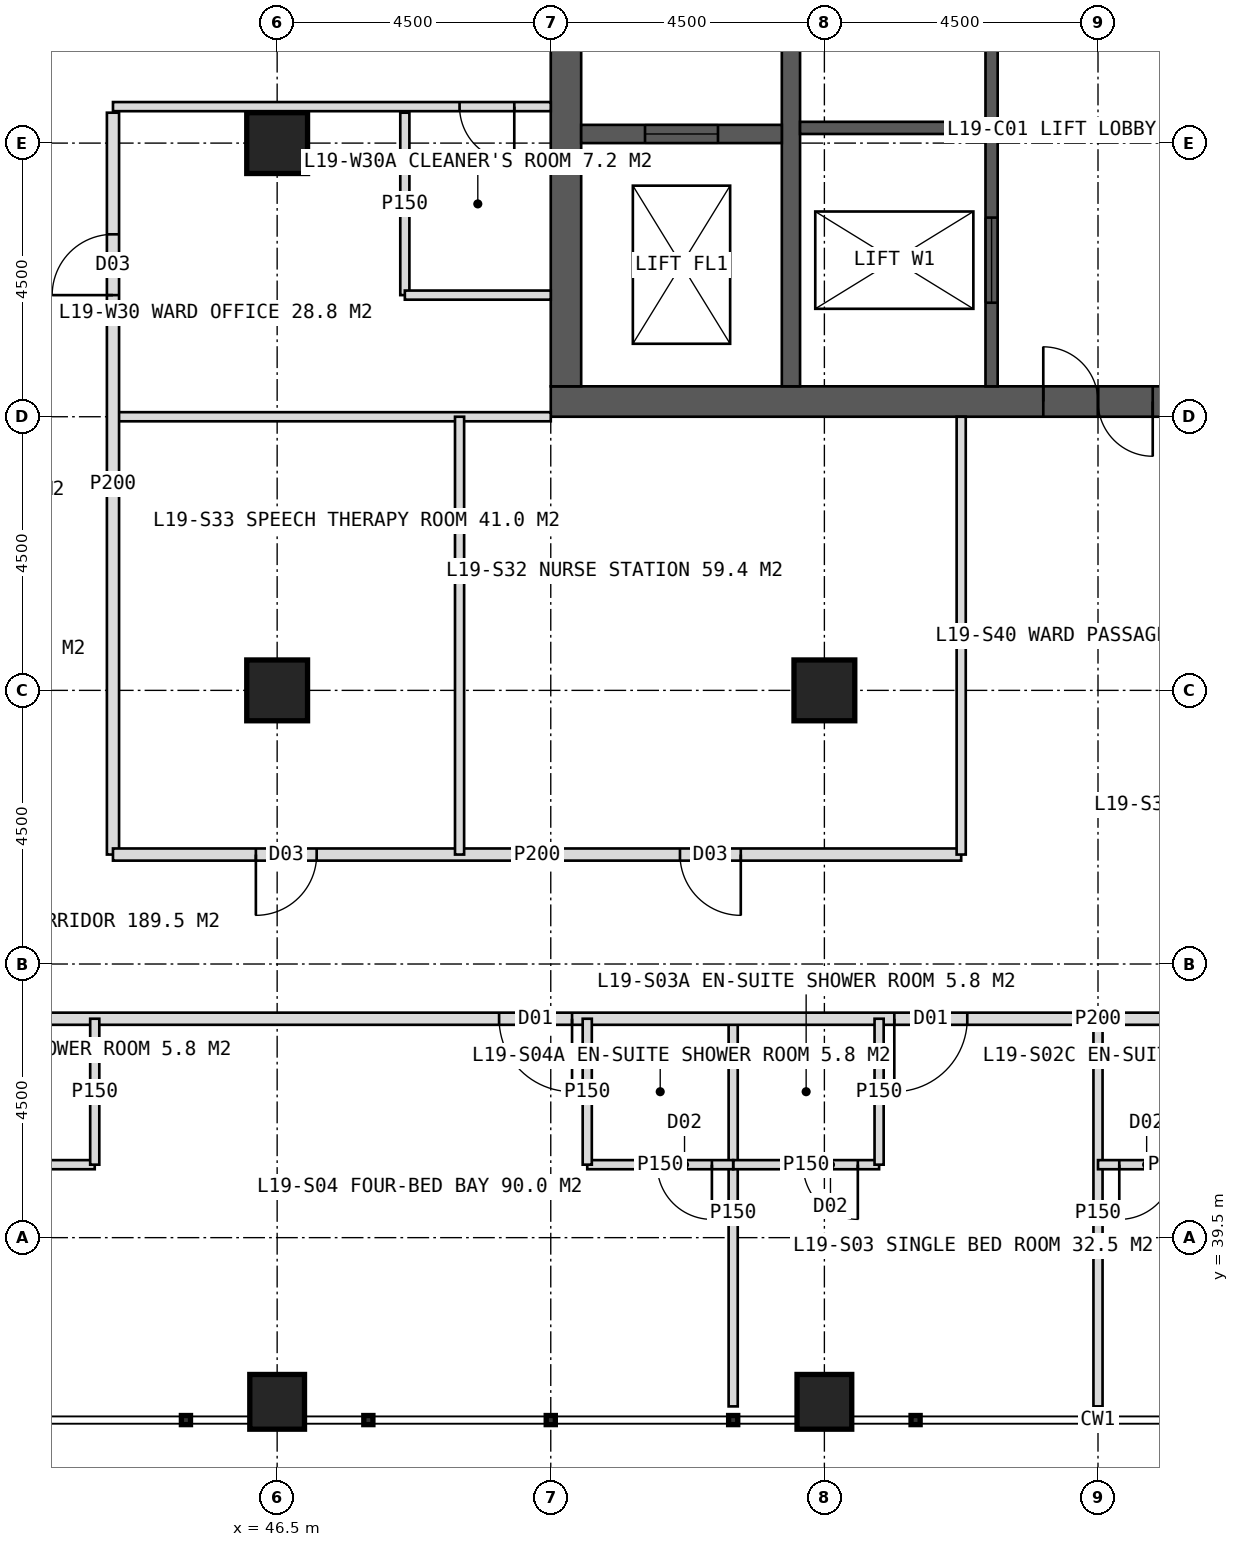
"""IFC4 building model, lengths in metres.
Left out: names, types, materials, properties, quantities, classifications, styles, units other than length and angle.
Written with IfcOpenShell. Run it as: python <this file> out.ifc"""

import sys

from ifc_helpers import new_model, si_unit, direction, frame, frame_2d, origin, origin_2d, place, context, subcontext, project, spatial, rectangle, hollow_rectangle, extrude, element, fill, save


model = new_model("IFC4")
c1 = context("Model", 3, precision=1e-05, world=origin(), true_north=direction((0.0, 1.0)))
c2 = subcontext(c1, "Body", "Model", "MODEL_VIEW")
j1 = project(units=[si_unit("LENGTHUNIT", "METRE"), si_unit("PLANEANGLEUNIT", "RADIAN")], contexts=[c1])
p1 = place(None, origin())
s1 = spatial("IfcSite", under=j1, at=p1, CompositionType="ELEMENT")
p2 = place(p1, origin())
s2 = spatial("IfcBuilding", under=s1, at=p2, CompositionType="ELEMENT")
p3 = place(p2, frame((0.0, 0.0, 83.0)))
s3 = spatial("IfcBuildingStorey", under=s2, at=p3, CompositionType="ELEMENT", Elevation=83.0)
p4 = place(p3, frame((51.0, 53.25, 0.0), z_axis=(0.0, 0.0, 1.0), x_axis=(1.0, 0.0, 0.0)))
e1 = element("IfcWall", 1, at=p4, inside=s3, PredefinedType="SHEAR", context=c2, shape_type="SweptSolid", body=[
    extrude(rectangle(XDim=18.0, YDim=0.5, at=frame_2d((9.0, 0.0))), origin(), (0.0, 0.0, 1.0), 4.0),
])
p5 = place(p4, frame((8.1, 0.0, 0.0)))
e2 = element("IfcOpeningElement", 2, at=p5, cuts=e1, PredefinedType="OPENING", context=c2, shape_type="SweptSolid", body=[
    extrude(rectangle(XDim=1.8, YDim=2.2, at=frame_2d((0.9, 1.1))), frame((0.0, 0.26, 0.0), z_axis=(0.0, -1.0, 0.0), x_axis=(1.0, 0.0, 0.0)), (0.0, 0.0, 1.0), 0.52),
])
p6 = place(p3, frame((51.25, 53.5, 0.0), z_axis=(0.0, 0.0, 1.0), x_axis=(0.0, 1.0, 0.0)))
e3 = element("IfcWall", 3, at=p6, inside=s3, PredefinedType="SHEAR", context=c2, shape_type="SweptSolid", body=[
    extrude(rectangle(XDim=17.0, YDim=0.5, at=frame_2d((8.5, 0.0))), origin(), (0.0, 0.0, 1.0), 4.0),
])
p7 = place(p6, frame((6.0, 0.0, 0.0)))
e4 = element("IfcOpeningElement", 4, at=p7, cuts=e3, PredefinedType="OPENING", context=c2, shape_type="SweptSolid", body=[
    extrude(rectangle(XDim=1.5, YDim=2.2, at=frame_2d((0.75, 1.1))), frame((0.0, 0.26, 0.0), z_axis=(0.0, -1.0, 0.0), x_axis=(1.0, 0.0, 0.0)), (0.0, 0.0, 1.0), 0.52),
])
p8 = place(p3, frame((54.95, 53.5, 0.0), z_axis=(0.0, 0.0, 1.0), x_axis=(0.0, 1.0, 0.0)))
e5 = element("IfcWall", 5, at=p8, inside=s3, PredefinedType="SHEAR", context=c2, shape_type="SweptSolid", body=[
    extrude(rectangle(XDim=17.0, YDim=0.3, at=frame_2d((8.5, 0.0))), origin(), (0.0, 0.0, 1.0), 4.0),
])
p9 = place(p3, frame((58.25, 53.5, 0.0), z_axis=(0.0, 0.0, 1.0), x_axis=(0.0, 1.0, 0.0)))
e6 = element("IfcWall", 6, at=p9, inside=s3, PredefinedType="SHEAR", context=c2, shape_type="SweptSolid", body=[
    extrude(rectangle(XDim=17.0, YDim=0.2, at=frame_2d((8.5, 0.0))), origin(), (0.0, 0.0, 1.0), 4.0),
])
p10 = place(p9, frame((1.375, 0.0, 0.0)))
e7 = element("IfcOpeningElement", 7, at=p10, cuts=e6, PredefinedType="OPENING", context=c2, shape_type="SweptSolid", body=[
    extrude(rectangle(XDim=1.4, YDim=2.2, at=frame_2d((0.7, 1.1))), frame((0.0, 0.11, 0.0), z_axis=(0.0, -1.0, 0.0), x_axis=(1.0, 0.0, 0.0)), (0.0, 0.0, 1.0), 0.22),
])
p11 = place(p9, frame((5.675, 0.0, 0.0)))
e8 = element("IfcOpeningElement", 8, at=p11, cuts=e6, PredefinedType="OPENING", context=c2, shape_type="SweptSolid", body=[
    extrude(rectangle(XDim=1.4, YDim=2.2, at=frame_2d((0.7, 1.1))), frame((0.0, 0.11, 0.0), z_axis=(0.0, -1.0, 0.0), x_axis=(1.0, 0.0, 0.0)), (0.0, 0.0, 1.0), 0.22),
])
p12 = place(p3, frame((55.1, 57.75, 0.0), z_axis=(0.0, 0.0, 1.0), x_axis=(1.0, 0.0, 0.0)))
e9 = element("IfcWall", 9, at=p12, inside=s3, PredefinedType="SHEAR", context=c2, shape_type="SweptSolid", body=[
    extrude(rectangle(XDim=3.05, YDim=0.2, at=frame_2d((1.525, 0.0))), origin(), (0.0, 0.0, 1.0), 4.0),
])
p13 = place(p3, frame((51.5, 57.65, 0.0), z_axis=(0.0, 0.0, 1.0), x_axis=(1.0, 0.0, 0.0)))
e10 = element("IfcWall", 10, at=p13, inside=s3, PredefinedType="SHEAR", context=c2, shape_type="SweptSolid", body=[
    extrude(rectangle(XDim=3.3, YDim=0.3, at=frame_2d((1.65, 0.0))), origin(), (0.0, 0.0, 1.0), 4.0),
])
p14 = place(p13, frame((1.05, 0.0, 0.0)))
e11 = element("IfcOpeningElement", 11, at=p14, cuts=e10, PredefinedType="OPENING", context=c2, shape_type="SweptSolid", body=[
    extrude(rectangle(XDim=1.2, YDim=2.2, at=frame_2d((0.6, 1.1))), frame((0.0, 0.16, 0.0), z_axis=(0.0, -1.0, 0.0), x_axis=(1.0, 0.0, 0.0)), (0.0, 0.0, 1.0), 0.32),
])
for number, where, z_axis, x_axis in (
    (12, (46.5, 48.5, 0.0), (0.0, 0.0, 1.0), (1.0, 0.0, 0.0)),
    (13, (55.5, 48.5, 0.0), (0.0, 0.0, 1.0), (1.0, 0.0, 0.0)),
    (14, (46.5, 57.5, 0.0), (0.0, 0.0, 1.0), (1.0, 0.0, 0.0)),
):
    element("IfcColumn", number, at=place(p3, frame(where, z_axis=z_axis, x_axis=x_axis)), inside=s3, PredefinedType="COLUMN", context=c2, shape_type="SweptSolid", body=[
        extrude(hollow_rectangle(XDim=1.0, YDim=1.0, WallThickness=0.1, at=origin_2d()), origin(), (0.0, 0.0, 1.0), 4.0),
    ])
for number, where, z_axis, x_axis in (
    (15, (46.5, 36.8, 0.0), (0.0, 0.0, 1.0), (1.0, 0.0, 0.0)),
    (16, (55.5, 36.8, 0.0), (0.0, 0.0, 1.0), (1.0, 0.0, 0.0)),
):
    element("IfcColumn", number, at=place(p3, frame(where, z_axis=z_axis, x_axis=x_axis)), inside=s3, PredefinedType="COLUMN", context=c2, shape_type="SweptSolid", body=[
        extrude(hollow_rectangle(XDim=0.9, YDim=0.9, WallThickness=0.08, at=origin_2d()), origin(), (0.0, 0.0, 1.0), 4.0),
    ])
p15 = place(p3, frame((51.0, 53.0, 0.0), z_axis=(0.0, 0.0, 1.0), x_axis=(-1.0, 0.0, 0.0)))
e17 = element("IfcWall", 17, at=p15, inside=s3, PredefinedType="PARTITIONING", context=c2, shape_type="SweptSolid", body=[
    extrude(rectangle(XDim=7.2, YDim=0.15, at=frame_2d((3.6, 0.0))), origin(), (0.0, 0.0, 1.0), 3.75),
])
p16 = place(p3, frame((43.8, 45.8, 0.0), z_axis=(0.0, 0.0, 1.0), x_axis=(0.0, 1.0, 0.0)))
e18 = element("IfcWall", 18, at=p16, inside=s3, PredefinedType="PARTITIONING", context=c2, shape_type="SweptSolid", body=[
    extrude(rectangle(XDim=12.2, YDim=0.2, at=frame_2d((6.1, 0.0))), origin(), (0.0, 0.0, 1.0), 3.75),
])
p17 = place(p16, frame((9.2, 0.0, 0.0)))
e19 = element("IfcOpeningElement", 19, at=p17, cuts=e18, PredefinedType="OPENING", context=c2, shape_type="SweptSolid", body=[
    extrude(rectangle(XDim=1.0, YDim=2.1, at=frame_2d((0.5, 1.05))), frame((0.0, 0.11, 0.0), z_axis=(0.0, -1.0, 0.0), x_axis=(1.0, 0.0, 0.0)), (0.0, 0.0, 1.0), 0.22),
])
p18 = place(p3, frame((51.0, 58.1, 0.0), z_axis=(0.0, 0.0, 1.0), x_axis=(-1.0, 0.0, 0.0)))
e20 = element("IfcWall", 20, at=p18, inside=s3, PredefinedType="PARTITIONING", context=c2, shape_type="SweptSolid", body=[
    extrude(rectangle(XDim=7.2, YDim=0.15, at=frame_2d((3.6, 0.0))), origin(), (0.0, 0.0, 1.0), 3.75),
])
p19 = place(p18, frame((0.6, 0.0, 0.0)))
e21 = element("IfcOpeningElement", 21, at=p19, cuts=e20, PredefinedType="OPENING", context=c2, shape_type="SweptSolid", body=[
    extrude(rectangle(XDim=0.9, YDim=2.1, at=frame_2d((0.45, 1.05))), frame((0.0, 0.085, 0.0), z_axis=(0.0, -1.0, 0.0), x_axis=(1.0, 0.0, 0.0)), (0.0, 0.0, 1.0), 0.17),
])
p20 = place(p3, frame((48.6, 55.0, 0.0), z_axis=(0.0, 0.0, 1.0), x_axis=(0.0, 1.0, 0.0)))
e22 = element("IfcWall", 22, at=p20, inside=s3, PredefinedType="PARTITIONING", context=c2, shape_type="SweptSolid", body=[
    extrude(rectangle(XDim=3.0, YDim=0.15, at=frame_2d((1.5, 0.0))), origin(), (0.0, 0.0, 1.0), 3.75),
])
p21 = place(p3, frame((51.0, 55.0, 0.0), z_axis=(0.0, 0.0, 1.0), x_axis=(-1.0, 0.0, 0.0)))
e23 = element("IfcWall", 23, at=p21, inside=s3, PredefinedType="PARTITIONING", context=c2, shape_type="SweptSolid", body=[
    extrude(rectangle(XDim=2.4, YDim=0.15, at=frame_2d((1.2, 0.0))), origin(), (0.0, 0.0, 1.0), 3.75),
])
p22 = place(p3, frame((60.0, 43.1, 0.0), z_axis=(0.0, 0.0, 1.0), x_axis=(0.0, -1.0, 0.0)))
e24 = element("IfcWall", 24, at=p22, inside=s3, PredefinedType="PARTITIONING", context=c2, shape_type="SweptSolid", body=[
    extrude(rectangle(XDim=6.375, YDim=0.15, at=frame_2d((3.188, 0.0))), origin(), (0.0, 0.0, 1.0), 2.75),
])
p23 = place(p3, frame((54.0, 43.1, 0.0), z_axis=(0.0, 0.0, 1.0), x_axis=(0.0, -1.0, 0.0)))
e25 = element("IfcWall", 25, at=p23, inside=s3, PredefinedType="PARTITIONING", context=c2, shape_type="SweptSolid", body=[
    extrude(rectangle(XDim=6.375, YDim=0.15, at=frame_2d((3.188, 0.0))), origin(), (0.0, 0.0, 1.0), 3.75),
])
p24 = place(p3, frame((78.9, 43.1, 0.0), z_axis=(0.0, 0.0, 1.0), x_axis=(-1.0, 0.0, 0.0)))
e26 = element("IfcWall", 26, at=p24, inside=s3, PredefinedType="PARTITIONING", context=c2, shape_type="SweptSolid", body=[
    extrude(rectangle(XDim=37.8, YDim=0.2, at=frame_2d((18.9, 0.0))), origin(), (0.0, 0.0, 1.0), 3.75),
])
p25 = place(p24, frame((6.05, 0.0, 0.0)))
e27 = element("IfcOpeningElement", 27, at=p25, cuts=e26, PredefinedType="OPENING", context=c2, shape_type="SweptSolid", body=[
    extrude(rectangle(XDim=1.2, YDim=2.2, at=frame_2d((0.6, 1.1))), frame((0.0, 0.11, 0.0), z_axis=(0.0, -1.0, 0.0), x_axis=(1.0, 0.0, 0.0)), (0.0, 0.0, 1.0), 0.22),
])
p26 = place(p24, frame((12.55, 0.0, 0.0)))
e28 = element("IfcOpeningElement", 28, at=p26, cuts=e26, PredefinedType="OPENING", context=c2, shape_type="SweptSolid", body=[
    extrude(rectangle(XDim=1.2, YDim=2.2, at=frame_2d((0.6, 1.1))), frame((0.0, 0.11, 0.0), z_axis=(0.0, -1.0, 0.0), x_axis=(1.0, 0.0, 0.0)), (0.0, 0.0, 1.0), 0.22),
])
p27 = place(p24, frame((21.05, 0.0, 0.0)))
e29 = element("IfcOpeningElement", 29, at=p27, cuts=e26, PredefinedType="OPENING", context=c2, shape_type="SweptSolid", body=[
    extrude(rectangle(XDim=1.2, YDim=2.2, at=frame_2d((0.6, 1.1))), frame((0.0, 0.11, 0.0), z_axis=(0.0, -1.0, 0.0), x_axis=(1.0, 0.0, 0.0)), (0.0, 0.0, 1.0), 0.22),
])
p28 = place(p24, frame((27.55, 0.0, 0.0)))
e30 = element("IfcOpeningElement", 30, at=p28, cuts=e26, PredefinedType="OPENING", context=c2, shape_type="SweptSolid", body=[
    extrude(rectangle(XDim=1.2, YDim=2.2, at=frame_2d((0.6, 1.1))), frame((0.0, 0.11, 0.0), z_axis=(0.0, -1.0, 0.0), x_axis=(1.0, 0.0, 0.0)), (0.0, 0.0, 1.0), 0.22),
])
p29 = place(p3, frame((62.4, 40.7, 0.0), z_axis=(0.0, 0.0, 1.0), x_axis=(-1.0, 0.0, 0.0)))
e31 = element("IfcWall", 31, at=p29, inside=s3, PredefinedType="PARTITIONING", context=c2, shape_type="SweptSolid", body=[
    extrude(rectangle(XDim=2.4, YDim=0.15, at=frame_2d((1.2, 0.0))), origin(), (0.0, 0.0, 1.0), 3.75),
])
p30 = place(p29, frame((1.15, 0.0, 0.0)))
e32 = element("IfcOpeningElement", 32, at=p30, cuts=e31, PredefinedType="OPENING", context=c2, shape_type="SweptSolid", body=[
    extrude(rectangle(XDim=0.9, YDim=2.1, at=frame_2d((0.45, 1.05))), frame((0.0, 0.085, 0.0), z_axis=(0.0, -1.0, 0.0), x_axis=(1.0, 0.0, 0.0)), (0.0, 0.0, 1.0), 0.17),
])
p31 = place(p3, frame((56.4, 40.7, 0.0), z_axis=(0.0, 0.0, 1.0), x_axis=(-1.0, 0.0, 0.0)))
e33 = element("IfcWall", 33, at=p31, inside=s3, PredefinedType="PARTITIONING", context=c2, shape_type="SweptSolid", body=[
    extrude(rectangle(XDim=2.4, YDim=0.15, at=frame_2d((1.2, 0.0))), origin(), (0.0, 0.0, 1.0), 3.75),
])
p32 = place(p31, frame((0.35, 0.0, 0.0)))
e34 = element("IfcOpeningElement", 34, at=p32, cuts=e33, PredefinedType="OPENING", context=c2, shape_type="SweptSolid", body=[
    extrude(rectangle(XDim=0.9, YDim=2.1, at=frame_2d((0.45, 1.05))), frame((0.0, 0.085, 0.0), z_axis=(0.0, -1.0, 0.0), x_axis=(1.0, 0.0, 0.0)), (0.0, 0.0, 1.0), 0.17),
])
p33 = place(p3, frame((56.4, 43.1, 0.0), z_axis=(0.0, 0.0, 1.0), x_axis=(0.0, -1.0, 0.0)))
e35 = element("IfcWall", 35, at=p33, inside=s3, PredefinedType="PARTITIONING", context=c2, shape_type="SweptSolid", body=[
    extrude(rectangle(XDim=2.4, YDim=0.15, at=frame_2d((1.2, 0.0))), origin(), (0.0, 0.0, 1.0), 3.75),
])
p34 = place(p3, frame((54.0, 40.7, 0.0), z_axis=(0.0, 0.0, 1.0), x_axis=(-1.0, 0.0, 0.0)))
e36 = element("IfcWall", 36, at=p34, inside=s3, PredefinedType="PARTITIONING", context=c2, shape_type="SweptSolid", body=[
    extrude(rectangle(XDim=2.4, YDim=0.15, at=frame_2d((1.2, 0.0))), origin(), (0.0, 0.0, 1.0), 3.75),
])
p35 = place(p34, frame((0.35, 0.0, 0.0)))
e37 = element("IfcOpeningElement", 37, at=p35, cuts=e36, PredefinedType="OPENING", context=c2, shape_type="SweptSolid", body=[
    extrude(rectangle(XDim=0.9, YDim=2.1, at=frame_2d((0.45, 1.05))), frame((0.0, 0.085, 0.0), z_axis=(0.0, -1.0, 0.0), x_axis=(1.0, 0.0, 0.0)), (0.0, 0.0, 1.0), 0.17),
])
p36 = place(p3, frame((51.6, 43.1, 0.0), z_axis=(0.0, 0.0, 1.0), x_axis=(0.0, -1.0, 0.0)))
e38 = element("IfcWall", 38, at=p36, inside=s3, PredefinedType="PARTITIONING", context=c2, shape_type="SweptSolid", body=[
    extrude(rectangle(XDim=2.4, YDim=0.15, at=frame_2d((1.2, 0.0))), origin(), (0.0, 0.0, 1.0), 3.75),
])
p37 = place(p3, frame((43.5, 40.7, 0.0), z_axis=(0.0, 0.0, 1.0), x_axis=(-1.0, 0.0, 0.0)))
e39 = element("IfcWall", 39, at=p37, inside=s3, PredefinedType="PARTITIONING", context=c2, shape_type="SweptSolid", body=[
    extrude(rectangle(XDim=2.4, YDim=0.15, at=frame_2d((1.2, 0.0))), origin(), (0.0, 0.0, 1.0), 3.75),
])
p38 = place(p37, frame((1.15, 0.0, 0.0)))
e40 = element("IfcOpeningElement", 40, at=p38, cuts=e39, PredefinedType="OPENING", context=c2, shape_type="SweptSolid", body=[
    extrude(rectangle(XDim=0.9, YDim=2.1, at=frame_2d((0.45, 1.05))), frame((0.0, 0.085, 0.0), z_axis=(0.0, -1.0, 0.0), x_axis=(1.0, 0.0, 0.0)), (0.0, 0.0, 1.0), 0.17),
])
p39 = place(p3, frame((43.5, 43.1, 0.0), z_axis=(0.0, 0.0, 1.0), x_axis=(0.0, -1.0, 0.0)))
e41 = element("IfcWall", 41, at=p39, inside=s3, PredefinedType="PARTITIONING", context=c2, shape_type="SweptSolid", body=[
    extrude(rectangle(XDim=2.4, YDim=0.15, at=frame_2d((1.2, 0.0))), origin(), (0.0, 0.0, 1.0), 3.75),
])
p40 = place(p3, frame((57.75, 45.8, 0.0), z_axis=(0.0, 0.0, 1.0), x_axis=(-1.0, 0.0, 0.0)))
e42 = element("IfcWall", 42, at=p40, inside=s3, PredefinedType="PARTITIONING", context=c2, shape_type="SweptSolid", body=[
    extrude(rectangle(XDim=13.95, YDim=0.2, at=frame_2d((6.975, 0.0))), origin(), (0.0, 0.0, 1.0), 3.75),
])
p41 = place(p40, frame((3.625, 0.0, 0.0)))
e43 = element("IfcOpeningElement", 43, at=p41, cuts=e42, PredefinedType="OPENING", context=c2, shape_type="SweptSolid", body=[
    extrude(rectangle(XDim=1.0, YDim=2.1, at=frame_2d((0.5, 1.05))), frame((0.0, 0.11, 0.0), z_axis=(0.0, -1.0, 0.0), x_axis=(1.0, 0.0, 0.0)), (0.0, 0.0, 1.0), 0.22),
])
p42 = place(p40, frame((10.6, 0.0, 0.0)))
e44 = element("IfcOpeningElement", 44, at=p42, cuts=e42, PredefinedType="OPENING", context=c2, shape_type="SweptSolid", body=[
    extrude(rectangle(XDim=1.0, YDim=2.1, at=frame_2d((0.5, 1.05))), frame((0.0, 0.11, 0.0), z_axis=(0.0, -1.0, 0.0), x_axis=(1.0, 0.0, 0.0)), (0.0, 0.0, 1.0), 0.22),
])
for number, where, z_axis, x_axis in (
    (45, (57.75, 53.0, 0.0), (0.0, 0.0, 1.0), (0.0, -1.0, 0.0)),
    (46, (49.5, 53.0, 0.0), (0.0, 0.0, 1.0), (0.0, -1.0, 0.0)),
):
    element("IfcWall", number, at=place(p3, frame(where, z_axis=z_axis, x_axis=x_axis)), inside=s3, PredefinedType="PARTITIONING", context=c2, shape_type="SweptSolid", body=[
        extrude(rectangle(XDim=7.2, YDim=0.15, at=frame_2d((3.6, 0.0))), origin(), (0.0, 0.0, 1.0), 3.75),
    ])
p43 = place(p19, origin())
e47 = element("IfcDoor", 47, at=p43, inside=s3, OperationType="SINGLE_SWING_LEFT", PredefinedType="DOOR", context=c2, shape_type="SweptSolid", body=[
    extrude(rectangle(XDim=0.9, YDim=2.1, at=frame_2d((0.45, 1.05))), frame((0.0, 0.025, 0.0), z_axis=(0.0, -1.0, 0.0), x_axis=(1.0, 0.0, 0.0)), (0.0, 0.0, 1.0), 0.05),
])
fill(e21, e47)
p44 = place(p17, origin())
e48 = element("IfcDoor", 48, at=p44, inside=s3, OperationType="SINGLE_SWING_LEFT", PredefinedType="DOOR", context=c2, shape_type="SweptSolid", body=[
    extrude(rectangle(XDim=1.0, YDim=2.1, at=frame_2d((0.5, 1.05))), frame((0.0, 0.025, 0.0), z_axis=(0.0, -1.0, 0.0), x_axis=(1.0, 0.0, 0.0)), (0.0, 0.0, 1.0), 0.05),
])
fill(e19, e48)
p45 = place(p30, origin())
e49 = element("IfcDoor", 49, at=p45, inside=s3, OperationType="SINGLE_SWING_RIGHT", PredefinedType="DOOR", context=c2, shape_type="SweptSolid", body=[
    extrude(rectangle(XDim=0.9, YDim=2.1, at=frame_2d((0.45, 1.05))), frame((0.0, 0.025, 0.0), z_axis=(0.0, -1.0, 0.0), x_axis=(1.0, 0.0, 0.0)), (0.0, 0.0, 1.0), 0.05),
])
fill(e32, e49)
p46 = place(p27, origin())
e50 = element("IfcDoor", 50, at=p46, inside=s3, OperationType="SINGLE_SWING_RIGHT", PredefinedType="DOOR", context=c2, shape_type="SweptSolid", body=[
    extrude(rectangle(XDim=1.2, YDim=2.2, at=frame_2d((0.6, 1.1))), frame((0.0, 0.025, 0.0), z_axis=(0.0, -1.0, 0.0), x_axis=(1.0, 0.0, 0.0)), (0.0, 0.0, 1.0), 0.05),
])
fill(e29, e50)
p47 = place(p32, origin())
e51 = element("IfcDoor", 51, at=p47, inside=s3, OperationType="SINGLE_SWING_LEFT", PredefinedType="DOOR", context=c2, shape_type="SweptSolid", body=[
    extrude(rectangle(XDim=0.9, YDim=2.1, at=frame_2d((0.45, 1.05))), frame((0.0, 0.025, 0.0), z_axis=(0.0, -1.0, 0.0), x_axis=(1.0, 0.0, 0.0)), (0.0, 0.0, 1.0), 0.05),
])
fill(e34, e51)
p48 = place(p28, origin())
e52 = element("IfcDoor", 52, at=p48, inside=s3, OperationType="SINGLE_SWING_LEFT", PredefinedType="DOOR", context=c2, shape_type="SweptSolid", body=[
    extrude(rectangle(XDim=1.2, YDim=2.2, at=frame_2d((0.6, 1.1))), frame((0.0, 0.025, 0.0), z_axis=(0.0, -1.0, 0.0), x_axis=(1.0, 0.0, 0.0)), (0.0, 0.0, 1.0), 0.05),
])
fill(e30, e52)
p49 = place(p35, origin())
e53 = element("IfcDoor", 53, at=p49, inside=s3, OperationType="SINGLE_SWING_LEFT", PredefinedType="DOOR", context=c2, shape_type="SweptSolid", body=[
    extrude(rectangle(XDim=0.9, YDim=2.1, at=frame_2d((0.45, 1.05))), frame((0.0, 0.025, 0.0), z_axis=(0.0, -1.0, 0.0), x_axis=(1.0, 0.0, 0.0)), (0.0, 0.0, 1.0), 0.05),
])
fill(e37, e53)
p50 = place(p41, origin())
e54 = element("IfcDoor", 54, at=p50, inside=s3, OperationType="SINGLE_SWING_LEFT", PredefinedType="DOOR", context=c2, shape_type="SweptSolid", body=[
    extrude(rectangle(XDim=1.0, YDim=2.1, at=frame_2d((0.5, 1.05))), frame((0.0, 0.025, 0.0), z_axis=(0.0, -1.0, 0.0), x_axis=(1.0, 0.0, 0.0)), (0.0, 0.0, 1.0), 0.05),
])
fill(e43, e54)
p51 = place(p42, origin())
e55 = element("IfcDoor", 55, at=p51, inside=s3, OperationType="SINGLE_SWING_RIGHT", PredefinedType="DOOR", context=c2, shape_type="SweptSolid", body=[
    extrude(rectangle(XDim=1.0, YDim=2.1, at=frame_2d((0.5, 1.05))), frame((0.0, 0.025, 0.0), z_axis=(0.0, -1.0, 0.0), x_axis=(1.0, 0.0, 0.0)), (0.0, 0.0, 1.0), 0.05),
])
fill(e44, e55)
p52 = place(p5, origin())
e56 = element("IfcDoor", 56, at=p52, inside=s3, OperationType="DOUBLE_DOOR_SINGLE_SWING", PredefinedType="DOOR", context=c2, shape_type="SweptSolid", body=[
    extrude(rectangle(XDim=1.8, YDim=2.2, at=frame_2d((0.9, 1.1))), frame((0.0, 0.025, 0.0), z_axis=(0.0, -1.0, 0.0), x_axis=(1.0, 0.0, 0.0)), (0.0, 0.0, 1.0), 0.05),
])
fill(e2, e56)
p53 = place(p14, origin())
e57 = element("IfcDoor", 57, at=p53, inside=s3, OperationType="SLIDING_TO_LEFT", PredefinedType="DOOR", context=c2, shape_type="SweptSolid", body=[
    extrude(rectangle(XDim=1.2, YDim=2.2, at=frame_2d((0.6, 1.1))), frame((0.0, 0.025, 0.0), z_axis=(0.0, -1.0, 0.0), x_axis=(1.0, 0.0, 0.0)), (0.0, 0.0, 1.0), 0.05),
])
fill(e11, e57)
p54 = place(p10, origin())
e58 = element("IfcDoor", 58, at=p54, inside=s3, OperationType="SLIDING_TO_LEFT", PredefinedType="DOOR", context=c2, shape_type="SweptSolid", body=[
    extrude(rectangle(XDim=1.4, YDim=2.2, at=frame_2d((0.7, 1.1))), frame((0.0, 0.025, 0.0), z_axis=(0.0, -1.0, 0.0), x_axis=(1.0, 0.0, 0.0)), (0.0, 0.0, 1.0), 0.05),
])
fill(e7, e58)
save(model, sys.argv[1])
